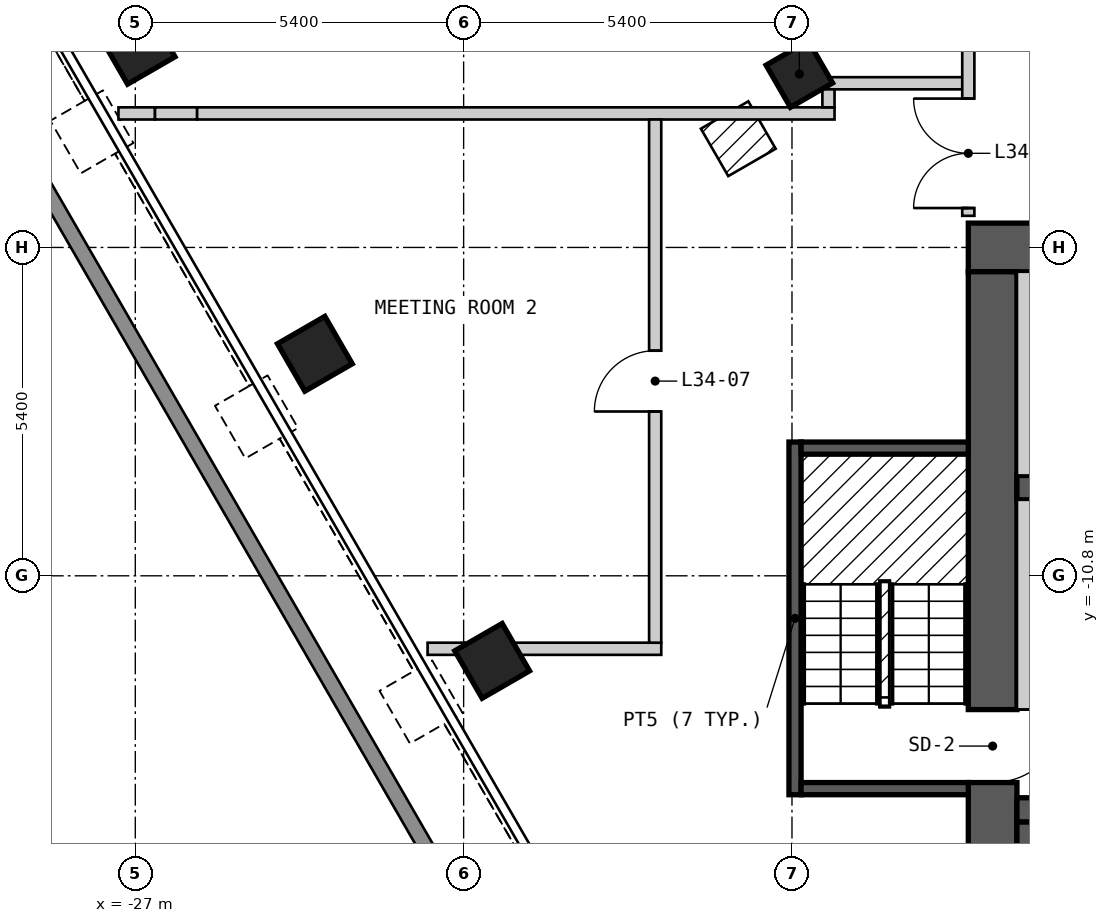
"""IFC4 building model, lengths in metres.
Left out: names, types, materials, properties, quantities, classifications, styles, units other than length and angle.
Written with IfcOpenShell. Run it as: python <this file> out.ifc"""

import sys

from ifc_helpers import new_model, si_unit, direction, frame, frame_2d, origin, origin_2d, place, context, subcontext, project, spatial, polyline, rectangle, outline, extrude, element, fill, save


model = new_model("IFC4")
c1 = context("Model", 3, precision=1e-05, world=origin(), true_north=direction((0.0, 1.0)))
c2 = subcontext(c1, "Body", "Model", "MODEL_VIEW")
j1 = project(units=[si_unit("LENGTHUNIT", "METRE"), si_unit("PLANEANGLEUNIT", "RADIAN")], contexts=[c1])
p1 = place(None, origin())
s1 = spatial("IfcSite", under=j1, at=p1, CompositionType="ELEMENT")
p2 = place(p1, origin())
s2 = spatial("IfcBuilding", under=s1, at=p2, CompositionType="ELEMENT")
p3 = place(p2, frame((0.0, 0.0, 111.6)))
s3 = spatial("IfcBuildingStorey", under=s2, at=p3, CompositionType="ELEMENT", Elevation=111.6)
for number, where, z_axis, x_axis in (
    (1, (-26.962, -2.1, 0.0), (0.0, 0.0, 1.0), (0.5, -0.866, 0.0)),
    (2, (-24.047, -7.149, 0.0), (0.0, 0.0, 1.0), (0.5, -0.866, 0.0)),
    (3, (-21.131, -12.199, 0.0), (0.0, 0.0, 1.0), (0.5, -0.866, 0.0)),
):
    element("IfcColumn", number, at=place(p3, frame(where, z_axis=z_axis, x_axis=x_axis)), inside=s3, PredefinedType="COLUMN", context=c2, shape_type="SweptSolid", body=[
        extrude(rectangle(XDim=0.9, YDim=0.9, at=origin_2d()), origin(), (0.0, 0.0, 1.0), 6.0),
    ])
p4 = place(p3, frame((-16.079, -2.549, 0.0), z_axis=(0.0, 0.0, 1.0), x_axis=(0.5, -0.866025403784, 0.0)))
e4 = element("IfcColumn", 4, at=p4, inside=s3, PredefinedType="COLUMN", context=c2, shape_type="SweptSolid", body=[
    extrude(rectangle(XDim=0.8, YDim=0.8, at=origin_2d()), origin(), (0.0, 0.0, 1.0), 6.0),
])
p5 = place(p3, frame((-13.3, -5.4, 0.0), z_axis=(0.0, 0.0, 1.0), x_axis=(1.0, 0.0, 0.0)))
e5 = element("IfcWall", 5, at=p5, inside=s3, PredefinedType="SHEAR", context=c2, shape_type="SweptSolid", body=[
    extrude(rectangle(XDim=26.6, YDim=0.8, at=frame_2d((13.3, 0.0))), origin(), (0.0, 0.0, 1.0), 5.7),
])
p6 = place(p5, frame((23.65, 0.0, 0.0)))
e6 = element("IfcOpeningElement", 6, at=p6, cuts=e5, PredefinedType="OPENING", context=c2, shape_type="SweptSolid", body=[
    extrude(rectangle(XDim=1.2, YDim=2.1, at=frame_2d((0.6, 1.05))), frame((0.0, 0.41, 0.0), z_axis=(0.0, -1.0, 0.0), x_axis=(1.0, 0.0, 0.0)), (0.0, 0.0, 1.0), 0.82),
])
p7 = place(p3, frame((-12.9, -18.2, 0.0), z_axis=(0.0, 0.0, 1.0), x_axis=(0.0, 1.0, 0.0)))
e7 = element("IfcWall", 7, at=p7, inside=s3, PredefinedType="SHEAR", context=c2, shape_type="SweptSolid", body=[
    extrude(rectangle(XDim=12.4, YDim=0.8, at=frame_2d((6.2, 0.0))), origin(), (0.0, 0.0, 1.0), 5.7),
])
p8 = place(p7, frame((4.0, 0.0, 0.0)))
e8 = element("IfcOpeningElement", 8, at=p8, cuts=e7, PredefinedType="OPENING", context=c2, shape_type="SweptSolid", body=[
    extrude(rectangle(XDim=1.2, YDim=2.1, at=frame_2d((0.6, 1.05))), frame((0.0, 0.41, 0.0), z_axis=(0.0, -1.0, 0.0), x_axis=(1.0, 0.0, 0.0)), (0.0, 0.0, 1.0), 0.82),
])
p9 = place(p3, frame((-12.5, -14.65, 0.0), z_axis=(0.0, 0.0, 1.0), x_axis=(1.0, 0.0, 0.0)))
e9 = element("IfcWall", 9, at=p9, inside=s3, PredefinedType="SHEAR", context=c2, shape_type="SweptSolid", body=[
    extrude(rectangle(XDim=25.0, YDim=0.4, at=frame_2d((12.5, 0.0))), origin(), (0.0, 0.0, 1.0), 5.7),
])
p10 = place(p9, frame((6.7, 0.0, 0.0)))
e10 = element("IfcOpeningElement", 10, at=p10, cuts=e9, PredefinedType="OPENING", context=c2, shape_type="SweptSolid", body=[
    extrude(rectangle(XDim=1.1, YDim=2.1, at=frame_2d((0.55, 1.05))), frame((0.0, 0.21, 0.0), z_axis=(0.0, -1.0, 0.0), x_axis=(1.0, 0.0, 0.0)), (0.0, 0.0, 1.0), 0.42),
])
p11 = place(p9, frame((9.0, 0.0, 0.0)))
e11 = element("IfcOpeningElement", 11, at=p11, cuts=e9, PredefinedType="OPENING", context=c2, shape_type="SweptSolid", body=[
    extrude(rectangle(XDim=1.1, YDim=2.1, at=frame_2d((0.55, 1.05))), frame((0.0, 0.21, 0.0), z_axis=(0.0, -1.0, 0.0), x_axis=(1.0, 0.0, 0.0)), (0.0, 0.0, 1.0), 0.42),
])
p12 = place(p9, frame((11.3, 0.0, 0.0)))
e12 = element("IfcOpeningElement", 12, at=p12, cuts=e9, PredefinedType="OPENING", context=c2, shape_type="SweptSolid", body=[
    extrude(rectangle(XDim=1.1, YDim=2.1, at=frame_2d((0.55, 1.05))), frame((0.0, 0.21, 0.0), z_axis=(0.0, -1.0, 0.0), x_axis=(1.0, 0.0, 0.0)), (0.0, 0.0, 1.0), 0.42),
])
p13 = place(p9, frame((13.6, 0.0, 0.0)))
e13 = element("IfcOpeningElement", 13, at=p13, cuts=e9, PredefinedType="OPENING", context=c2, shape_type="SweptSolid", body=[
    extrude(rectangle(XDim=1.1, YDim=2.1, at=frame_2d((0.55, 1.05))), frame((0.0, 0.21, 0.0), z_axis=(0.0, -1.0, 0.0), x_axis=(1.0, 0.0, 0.0)), (0.0, 0.0, 1.0), 0.42),
])
p14 = place(p9, frame((1.7, 0.0, 0.0), z_axis=(0.0, 0.0, 1.0), x_axis=(-1.0, 0.0, 0.0)))
e14 = element("IfcOpeningElement", 14, at=p14, cuts=e9, PredefinedType="OPENING", context=c2, shape_type="SweptSolid", body=[
    extrude(rectangle(XDim=1.2, YDim=2.1, at=frame_2d((0.6, 1.05))), frame((0.0, 0.21, 0.0), z_axis=(0.0, -1.0, 0.0), x_axis=(1.0, 0.0, 0.0)), (0.0, 0.0, 1.0), 0.42),
])
p15 = place(p9, frame((24.55, 0.0, 0.0), z_axis=(0.0, 0.0, 1.0), x_axis=(-1.0, 0.0, 0.0)))
e15 = element("IfcOpeningElement", 15, at=p15, cuts=e9, PredefinedType="OPENING", context=c2, shape_type="SweptSolid", body=[
    extrude(rectangle(XDim=1.2, YDim=2.1, at=frame_2d((0.6, 1.05))), frame((0.0, 0.21, 0.0), z_axis=(0.0, -1.0, 0.0), x_axis=(1.0, 0.0, 0.0)), (0.0, 0.0, 1.0), 0.42),
])
p16 = place(p9, frame((16.65, 0.0, 0.0), z_axis=(0.0, 0.0, 1.0), x_axis=(-1.0, 0.0, 0.0)))
e16 = element("IfcOpeningElement", 16, at=p16, cuts=e9, PredefinedType="OPENING", context=c2, shape_type="SweptSolid", body=[
    extrude(rectangle(XDim=0.9, YDim=2.1, at=frame_2d((0.45, 1.05))), frame((0.0, 0.21, 0.0), z_axis=(0.0, -1.0, 0.0), x_axis=(1.0, 0.0, 0.0)), (0.0, 0.0, 1.0), 0.42),
])
p17 = place(p9, frame((18.45, 0.0, 0.0), z_axis=(0.0, 0.0, 1.0), x_axis=(-1.0, 0.0, 0.0)))
e17 = element("IfcOpeningElement", 17, at=p17, cuts=e9, PredefinedType="OPENING", context=c2, shape_type="SweptSolid", body=[
    extrude(rectangle(XDim=0.9, YDim=2.1, at=frame_2d((0.45, 1.05))), frame((0.0, 0.21, 0.0), z_axis=(0.0, -1.0, 0.0), x_axis=(1.0, 0.0, 0.0)), (0.0, 0.0, 1.0), 0.42),
])
p18 = place(p3, frame((-12.5, -9.35, 0.0), z_axis=(0.0, 0.0, 1.0), x_axis=(1.0, 0.0, 0.0)))
e18 = element("IfcWall", 18, at=p18, inside=s3, PredefinedType="SHEAR", context=c2, shape_type="SweptSolid", body=[
    extrude(rectangle(XDim=22.7, YDim=0.4, at=frame_2d((11.35, 0.0))), origin(), (0.0, 0.0, 1.0), 5.7),
])
p19 = place(p18, frame((1.1, 0.0, 0.0)))
e19 = element("IfcOpeningElement", 19, at=p19, cuts=e18, PredefinedType="OPENING", context=c2, shape_type="SweptSolid", body=[
    extrude(rectangle(XDim=1.1, YDim=2.1, at=frame_2d((0.55, 1.05))), frame((0.0, 0.21, 0.0), z_axis=(0.0, -1.0, 0.0), x_axis=(1.0, 0.0, 0.0)), (0.0, 0.0, 1.0), 0.42),
])
p20 = place(p18, frame((3.9, 0.0, 0.0)))
e20 = element("IfcOpeningElement", 20, at=p20, cuts=e18, PredefinedType="OPENING", context=c2, shape_type="SweptSolid", body=[
    extrude(rectangle(XDim=1.1, YDim=2.1, at=frame_2d((0.55, 1.05))), frame((0.0, 0.21, 0.0), z_axis=(0.0, -1.0, 0.0), x_axis=(1.0, 0.0, 0.0)), (0.0, 0.0, 1.0), 0.42),
])
p21 = place(p18, frame((6.7, 0.0, 0.0)))
e21 = element("IfcOpeningElement", 21, at=p21, cuts=e18, PredefinedType="OPENING", context=c2, shape_type="SweptSolid", body=[
    extrude(rectangle(XDim=1.1, YDim=2.1, at=frame_2d((0.55, 1.05))), frame((0.0, 0.21, 0.0), z_axis=(0.0, -1.0, 0.0), x_axis=(1.0, 0.0, 0.0)), (0.0, 0.0, 1.0), 0.42),
])
p22 = place(p18, frame((9.0, 0.0, 0.0)))
e22 = element("IfcOpeningElement", 22, at=p22, cuts=e18, PredefinedType="OPENING", context=c2, shape_type="SweptSolid", body=[
    extrude(rectangle(XDim=1.1, YDim=2.1, at=frame_2d((0.55, 1.05))), frame((0.0, 0.21, 0.0), z_axis=(0.0, -1.0, 0.0), x_axis=(1.0, 0.0, 0.0)), (0.0, 0.0, 1.0), 0.42),
])
p23 = place(p18, frame((11.3, 0.0, 0.0)))
e23 = element("IfcOpeningElement", 23, at=p23, cuts=e18, PredefinedType="OPENING", context=c2, shape_type="SweptSolid", body=[
    extrude(rectangle(XDim=1.1, YDim=2.1, at=frame_2d((0.55, 1.05))), frame((0.0, 0.21, 0.0), z_axis=(0.0, -1.0, 0.0), x_axis=(1.0, 0.0, 0.0)), (0.0, 0.0, 1.0), 0.42),
])
p24 = place(p18, frame((13.6, 0.0, 0.0)))
e24 = element("IfcOpeningElement", 24, at=p24, cuts=e18, PredefinedType="OPENING", context=c2, shape_type="SweptSolid", body=[
    extrude(rectangle(XDim=1.1, YDim=2.1, at=frame_2d((0.55, 1.05))), frame((0.0, 0.21, 0.0), z_axis=(0.0, -1.0, 0.0), x_axis=(1.0, 0.0, 0.0)), (0.0, 0.0, 1.0), 0.42),
])
p25 = place(p18, frame((15.9, 0.0, 0.0)))
e25 = element("IfcOpeningElement", 25, at=p25, cuts=e18, PredefinedType="OPENING", context=c2, shape_type="SweptSolid", body=[
    extrude(rectangle(XDim=1.1, YDim=2.1, at=frame_2d((0.55, 1.05))), frame((0.0, 0.21, 0.0), z_axis=(0.0, -1.0, 0.0), x_axis=(1.0, 0.0, 0.0)), (0.0, 0.0, 1.0), 0.42),
])
p26 = place(p18, frame((18.2, 0.0, 0.0)))
e26 = element("IfcOpeningElement", 26, at=p26, cuts=e18, PredefinedType="OPENING", context=c2, shape_type="SweptSolid", body=[
    extrude(rectangle(XDim=1.1, YDim=2.1, at=frame_2d((0.55, 1.05))), frame((0.0, 0.21, 0.0), z_axis=(0.0, -1.0, 0.0), x_axis=(1.0, 0.0, 0.0)), (0.0, 0.0, 1.0), 0.42),
])
p27 = place(p18, frame((20.6, 0.0, 0.0)))
e27 = element("IfcOpeningElement", 27, at=p27, cuts=e18, PredefinedType="OPENING", context=c2, shape_type="SweptSolid", body=[
    extrude(rectangle(XDim=1.1, YDim=2.1, at=frame_2d((0.55, 1.05))), frame((0.0, 0.21, 0.0), z_axis=(0.0, -1.0, 0.0), x_axis=(1.0, 0.0, 0.0)), (0.0, 0.0, 1.0), 0.42),
])
p28 = place(p3, frame((-17.5, -23.437, 0.0), z_axis=(0.0, 0.0, 1.0), x_axis=(-0.500085431376, 0.865976074338, 0.0)))
e28 = element("IfcWall", 28, at=p28, inside=s3, PredefinedType="PARAPET", context=c2, shape_type="SweptSolid", body=[
    extrude(outline(polyline([(0.067, -0.125), (23.027, -0.125), (23.094, 0.125), (0.0, 0.125), (0.067, -0.125)])), origin(), (0.0, 0.0, 1.0), 1.6),
])
p29 = place(p3, frame((-22.193, -12.0, 0.0), z_axis=(0.0, 0.0, 1.0), x_axis=(1.0, 0.0, 0.0)))
e29 = element("IfcWall", 29, at=p29, inside=s3, PredefinedType="PARTITIONING", context=c2, shape_type="SweptSolid", body=[
    extrude(rectangle(XDim=0.601, YDim=0.2, at=frame_2d((0.301, 0.0))), origin(), (0.0, 0.0, 1.0), 5.7),
])
p30 = place(p3, frame((-21.592, -12.0, 0.0), z_axis=(0.0, 0.0, 1.0), x_axis=(1.0, 0.0, 0.0)))
e30 = element("IfcWall", 30, at=p30, inside=s3, PredefinedType="PARTITIONING", context=c2, shape_type="SweptSolid", body=[
    extrude(rectangle(XDim=0.677, YDim=0.2, at=frame_2d((0.338, 0.0))), origin(), (0.0, 0.0, 1.0), 5.07),
])
p31 = place(p3, frame((-20.915, -12.0, 0.0), z_axis=(0.0, 0.0, 1.0), x_axis=(1.0, 0.0, 0.0)))
e31 = element("IfcWall", 31, at=p31, inside=s3, PredefinedType="PARTITIONING", context=c2, shape_type="SweptSolid", body=[
    extrude(rectangle(XDim=2.565, YDim=0.2, at=frame_2d((1.282, 0.0))), origin(), (0.0, 0.0, 1.0), 5.7),
])
p32 = place(p3, frame((-27.277, -3.196, 0.0), z_axis=(0.0, 0.0, 1.0), x_axis=(1.0, 0.0, 0.0)))
e32 = element("IfcWall", 32, at=p32, inside=s3, PredefinedType="PARTITIONING", context=c2, shape_type="SweptSolid", body=[
    extrude(rectangle(XDim=0.601, YDim=0.2, at=frame_2d((0.301, 0.0))), origin(), (0.0, 0.0, 1.0), 5.7),
])
p33 = place(p3, frame((-26.676, -3.196, 0.0), z_axis=(0.0, 0.0, 1.0), x_axis=(1.0, 0.0, 0.0)))
e33 = element("IfcWall", 33, at=p33, inside=s3, PredefinedType="PARTITIONING", context=c2, shape_type="SweptSolid", body=[
    extrude(rectangle(XDim=0.693, YDim=0.2, at=frame_2d((0.347, 0.0))), origin(), (0.0, 0.0, 1.0), 5.07),
])
p34 = place(p3, frame((-25.983, -3.196, 0.0), z_axis=(0.0, 0.0, 1.0), x_axis=(1.0, 0.0, 0.0)))
e34 = element("IfcWall", 34, at=p34, inside=s3, PredefinedType="PARTITIONING", context=c2, shape_type="SweptSolid", body=[
    extrude(rectangle(XDim=10.483, YDim=0.2, at=frame_2d((5.241, 0.0))), origin(), (0.0, 0.0, 1.0), 5.7),
])
p35 = place(p3, frame((-15.6, -2.7, 0.0), z_axis=(0.0, 0.0, 1.0), x_axis=(1.0, 0.0, 0.0)))
e35 = element("IfcWall", 35, at=p35, inside=s3, PredefinedType="PARTITIONING", context=c2, shape_type="SweptSolid", body=[
    extrude(rectangle(XDim=2.3, YDim=0.2, at=frame_2d((1.15, 0.0))), origin(), (0.0, 0.0, 1.0), 5.7),
])
p36 = place(p3, frame((-18.45, -11.9, 0.0), z_axis=(0.0, 0.0, 1.0), x_axis=(0.0, 1.0, 0.0)))
e36 = element("IfcWall", 36, at=p36, inside=s3, PredefinedType="PARTITIONING", context=c2, shape_type="SweptSolid", body=[
    extrude(rectangle(XDim=8.604, YDim=0.2, at=frame_2d((4.302, 0.0))), origin(), (0.0, 0.0, 1.0), 5.7),
])
p37 = place(p36, frame((3.802, 0.0, 0.0)))
e37 = element("IfcOpeningElement", 37, at=p37, cuts=e36, PredefinedType="OPENING", context=c2, shape_type="SweptSolid", body=[
    extrude(rectangle(XDim=1.0, YDim=2.1, at=frame_2d((0.5, 1.05))), frame((0.0, 0.11, 0.0), z_axis=(0.0, -1.0, 0.0), x_axis=(1.0, 0.0, 0.0)), (0.0, 0.0, 1.0), 0.22),
])
p38 = place(p3, frame((-15.6, -3.096, 0.0), z_axis=(0.0, 0.0, 1.0), x_axis=(0.0, 1.0, 0.0)))
e38 = element("IfcWall", 38, at=p38, inside=s3, PredefinedType="PARTITIONING", context=c2, shape_type="SweptSolid", body=[
    extrude(rectangle(XDim=0.296, YDim=0.2, at=frame_2d((0.148, 0.0))), origin(), (0.0, 0.0, 1.0), 5.7),
])
p39 = place(p3, frame((-13.3, -4.88, 0.0), z_axis=(0.0, 0.0, 1.0), x_axis=(0.0, 1.0, 0.0)))
e39 = element("IfcWall", 39, at=p39, inside=s3, PredefinedType="PARTITIONING", context=c2, shape_type="SweptSolid", body=[
    extrude(rectangle(XDim=6.78, YDim=0.2, at=frame_2d((3.39, 0.0))), origin(), (0.0, 0.0, 1.0), 5.7),
])
p40 = place(p39, frame((0.128, 0.0, 0.0)))
e40 = element("IfcOpeningElement", 40, at=p40, cuts=e39, PredefinedType="OPENING", context=c2, shape_type="SweptSolid", body=[
    extrude(rectangle(XDim=1.8, YDim=2.1, at=frame_2d((0.9, 1.05))), frame((0.0, 0.11, 0.0), z_axis=(0.0, -1.0, 0.0), x_axis=(1.0, 0.0, 0.0)), (0.0, 0.0, 1.0), 0.22),
])
p41 = place(p3, frame((-16.15, -14.4, 0.0), z_axis=(0.0, 0.0, 1.0), x_axis=(0.0, 1.0, 0.0)))
e41 = element("IfcWall", 41, at=p41, inside=s3, PredefinedType="SOLIDWALL", context=c2, shape_type="SweptSolid", body=[
    extrude(rectangle(XDim=5.8, YDim=0.2, at=frame_2d((2.9, 0.0))), origin(), (0.0, 0.0, 1.0), 5.7),
])
for number, where, z_axis, x_axis in (
    (42, (-16.05, -14.3, 0.0), (0.0, 0.0, 1.0), (1.0, 0.0, 0.0)),
    (43, (-16.05, -8.7, 0.0), (0.0, 0.0, 1.0), (1.0, 0.0, 0.0)),
):
    element("IfcWall", number, at=place(p3, frame(where, z_axis=z_axis, x_axis=x_axis)), inside=s3, PredefinedType="SOLIDWALL", context=c2, shape_type="SweptSolid", body=[
        extrude(rectangle(XDim=2.75, YDim=0.2, at=frame_2d((1.375, 0.0))), origin(), (0.0, 0.0, 1.0), 5.7),
    ])
p42 = place(p3, frame((-12.3, -18.2, 0.0), z_axis=(0.0, 0.0, 1.0), x_axis=(0.0, 1.0, 0.0)))
e44 = element("IfcWall", 44, at=p42, inside=s3, PredefinedType="SOLIDWALL", context=c2, shape_type="SweptSolid", body=[
    extrude(rectangle(XDim=3.35, YDim=0.4, at=frame_2d((1.675, 0.0))), origin(), (0.0, 0.0, 1.0), 5.7),
])
p43 = place(p3, frame((-12.3, -13.0, 0.0), z_axis=(0.0, 0.0, 1.0), x_axis=(0.0, 1.0, 0.0)))
e45 = element("IfcWall", 45, at=p43, inside=s3, PredefinedType="PARTITIONING", context=c2, shape_type="SweptSolid", body=[
    extrude(rectangle(XDim=3.45, YDim=0.4, at=frame_2d((1.725, 0.0))), origin(), (0.0, 0.0, 1.0), 5.7),
])
p44 = place(p3, frame((-12.3, -9.15, 0.0), z_axis=(0.0, 0.0, 1.0), x_axis=(0.0, 1.0, 0.0)))
e46 = element("IfcWall", 46, at=p44, inside=s3, PredefinedType="SOLIDWALL", context=c2, shape_type="SweptSolid", body=[
    extrude(rectangle(XDim=3.35, YDim=0.4, at=frame_2d((1.675, 0.0))), origin(), (0.0, 0.0, 1.0), 5.7),
])
p45 = place(p37, origin())
e47 = element("IfcDoor", 47, at=p45, inside=s3, OperationType="SINGLE_SWING_LEFT", PredefinedType="DOOR", context=c2, shape_type="SweptSolid", body=[
    extrude(rectangle(XDim=1.0, YDim=2.1, at=frame_2d((0.5, 1.05))), frame((0.0, 0.025, 0.0), z_axis=(0.0, -1.0, 0.0), x_axis=(1.0, 0.0, 0.0)), (0.0, 0.0, 1.0), 0.05),
])
fill(e37, e47)
p46 = place(p40, origin())
e48 = element("IfcDoor", 48, at=p46, inside=s3, OperationType="DOUBLE_DOOR_SINGLE_SWING", PredefinedType="DOOR", context=c2, shape_type="SweptSolid", body=[
    extrude(rectangle(XDim=1.8, YDim=2.1, at=frame_2d((0.9, 1.05))), frame((0.0, 0.025, 0.0), z_axis=(0.0, -1.0, 0.0), x_axis=(1.0, 0.0, 0.0)), (0.0, 0.0, 1.0), 0.05),
])
fill(e40, e48)
p47 = place(p8, origin())
e49 = element("IfcDoor", 49, at=p47, inside=s3, OperationType="SINGLE_SWING_RIGHT", PredefinedType="DOOR", context=c2, shape_type="SweptSolid", body=[
    extrude(rectangle(XDim=1.2, YDim=2.1, at=frame_2d((0.6, 1.05))), frame((0.0, 0.025, 0.0), z_axis=(0.0, -1.0, 0.0), x_axis=(1.0, 0.0, 0.0)), (0.0, 0.0, 1.0), 0.05),
])
fill(e8, e49)
save(model, sys.argv[1])
